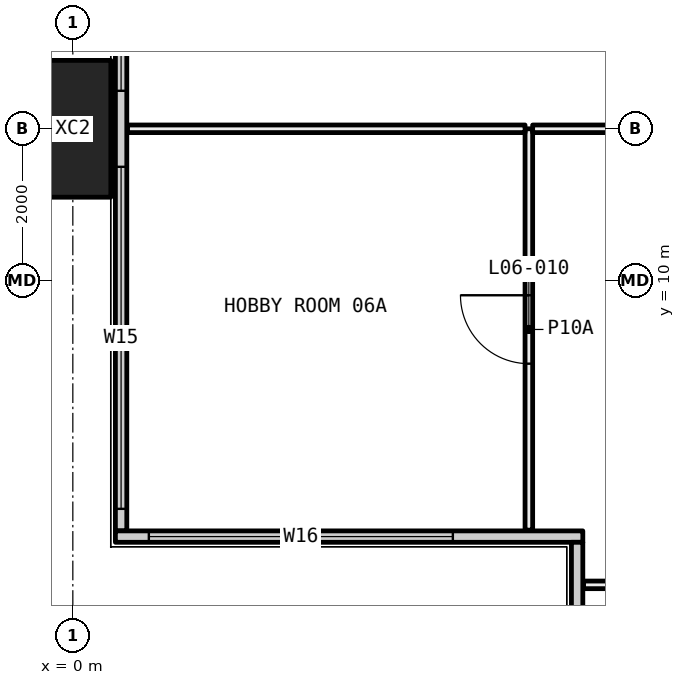
"""IFC4 building model, lengths in metres.
Left out: names, types, materials, properties, quantities, classifications, styles, units other than length and angle.
Written with IfcOpenShell. Run it as: python <this file> out.ifc"""

import sys

from ifc_helpers import new_model, si_unit, direction, frame, frame_2d, origin, origin_2d, place, context, subcontext, project, spatial, rectangle, hollow_rectangle, extrude, element, fill, save


model = new_model("IFC4")
c1 = context("Model", 3, precision=1e-05, world=origin(), true_north=direction((0.0, 1.0)))
c2 = subcontext(c1, "Body", "Model", "MODEL_VIEW")
j1 = project(units=[si_unit("LENGTHUNIT", "METRE"), si_unit("PLANEANGLEUNIT", "RADIAN")], contexts=[c1])
p1 = place(None, origin())
s1 = spatial("IfcSite", under=j1, at=p1, CompositionType="ELEMENT")
p2 = place(p1, origin())
s2 = spatial("IfcBuilding", under=s1, at=p2, CompositionType="ELEMENT")
p3 = place(p2, frame((0.0, 0.0, 33.45)))
s3 = spatial("IfcBuildingStorey", under=s2, at=p3, CompositionType="ELEMENT", Elevation=33.45)
p4 = place(p3, frame((0.0, 12.0, -0.4), z_axis=(0.0, 0.0, 1.0), x_axis=(0.0, 1.0, 0.0)))
e1 = element("IfcColumn", 1, at=p4, inside=s3, PredefinedType="COLUMN", context=c2, shape_type="SweptSolid", body=[
    extrude(hollow_rectangle(XDim=1.8, YDim=1.0, WallThickness=0.07, at=origin_2d()), origin(), (0.0, 0.0, 1.0), 3.45),
])
p5 = place(p3, frame((0.635, 6.71, 0.0), z_axis=(0.0, 0.0, 1.0), x_axis=(0.0, 1.0, 0.0)))
e2 = element("IfcWall", 2, at=p5, inside=s3, PredefinedType="ELEMENTEDWALL", context=c2, shape_type="SweptSolid", body=[
    extrude(rectangle(XDim=34.58, YDim=0.15, at=frame_2d((17.29, 0.0))), origin(), (0.0, 0.0, 1.0), 3.05),
])
p6 = place(p5, frame((0.29, 0.0, 0.45)))
e3 = element("IfcOpeningElement", 3, at=p6, cuts=e2, PredefinedType="OPENING", context=c2, shape_type="SweptSolid", body=[
    extrude(rectangle(XDim=4.5, YDim=2.55, at=frame_2d((2.25, 1.275))), frame((0.0, 0.085, 0.0), z_axis=(0.0, -1.0, 0.0), x_axis=(1.0, 0.0, 0.0)), (0.0, 0.0, 1.0), 0.17),
])
p7 = place(p5, frame((5.79, 0.0, 0.45)))
e4 = element("IfcOpeningElement", 4, at=p7, cuts=e2, PredefinedType="OPENING", context=c2, shape_type="SweptSolid", body=[
    extrude(rectangle(XDim=1.25, YDim=2.55, at=frame_2d((0.625, 1.275))), frame((0.0, 0.085, 0.0), z_axis=(0.0, -1.0, 0.0), x_axis=(1.0, 0.0, 0.0)), (0.0, 0.0, 1.0), 0.17),
])
p8 = place(p5, frame((9.79, 0.0, 0.45)))
e5 = element("IfcOpeningElement", 5, at=p8, cuts=e2, PredefinedType="OPENING", context=c2, shape_type="SweptSolid", body=[
    extrude(rectangle(XDim=1.0, YDim=2.55, at=frame_2d((0.5, 1.275))), frame((0.0, 0.085, 0.0), z_axis=(0.0, -1.0, 0.0), x_axis=(1.0, 0.0, 0.0)), (0.0, 0.0, 1.0), 0.17),
])
p9 = place(p5, frame((11.79, 0.0, 0.45)))
e6 = element("IfcOpeningElement", 6, at=p9, cuts=e2, PredefinedType="OPENING", context=c2, shape_type="SweptSolid", body=[
    extrude(rectangle(XDim=1.0, YDim=2.55, at=frame_2d((0.5, 1.275))), frame((0.0, 0.085, 0.0), z_axis=(0.0, -1.0, 0.0), x_axis=(1.0, 0.0, 0.0)), (0.0, 0.0, 1.0), 0.17),
])
p10 = place(p5, frame((15.54, 0.0, 0.45)))
e7 = element("IfcOpeningElement", 7, at=p10, cuts=e2, PredefinedType="OPENING", context=c2, shape_type="SweptSolid", body=[
    extrude(rectangle(XDim=1.25, YDim=2.55, at=frame_2d((0.625, 1.275))), frame((0.0, 0.085, 0.0), z_axis=(0.0, -1.0, 0.0), x_axis=(1.0, 0.0, 0.0)), (0.0, 0.0, 1.0), 0.17),
])
p11 = place(p5, frame((17.79, 0.0, 0.45)))
e8 = element("IfcOpeningElement", 8, at=p11, cuts=e2, PredefinedType="OPENING", context=c2, shape_type="SweptSolid", body=[
    extrude(rectangle(XDim=1.25, YDim=2.55, at=frame_2d((0.625, 1.275))), frame((0.0, 0.085, 0.0), z_axis=(0.0, -1.0, 0.0), x_axis=(1.0, 0.0, 0.0)), (0.0, 0.0, 1.0), 0.17),
])
p12 = place(p5, frame((21.79, 0.0, 0.45)))
e9 = element("IfcOpeningElement", 9, at=p12, cuts=e2, PredefinedType="OPENING", context=c2, shape_type="SweptSolid", body=[
    extrude(rectangle(XDim=1.0, YDim=2.55, at=frame_2d((0.5, 1.275))), frame((0.0, 0.085, 0.0), z_axis=(0.0, -1.0, 0.0), x_axis=(1.0, 0.0, 0.0)), (0.0, 0.0, 1.0), 0.17),
])
p13 = place(p5, frame((23.79, 0.0, 0.45)))
e10 = element("IfcOpeningElement", 10, at=p13, cuts=e2, PredefinedType="OPENING", context=c2, shape_type="SweptSolid", body=[
    extrude(rectangle(XDim=1.0, YDim=2.55, at=frame_2d((0.5, 1.275))), frame((0.0, 0.085, 0.0), z_axis=(0.0, -1.0, 0.0), x_axis=(1.0, 0.0, 0.0)), (0.0, 0.0, 1.0), 0.17),
])
p14 = place(p5, frame((27.54, 0.0, 0.45)))
e11 = element("IfcOpeningElement", 11, at=p14, cuts=e2, PredefinedType="OPENING", context=c2, shape_type="SweptSolid", body=[
    extrude(rectangle(XDim=1.25, YDim=2.55, at=frame_2d((0.625, 1.275))), frame((0.0, 0.085, 0.0), z_axis=(0.0, -1.0, 0.0), x_axis=(1.0, 0.0, 0.0)), (0.0, 0.0, 1.0), 0.17),
])
p15 = place(p5, frame((29.79, 0.0, 0.45)))
e12 = element("IfcOpeningElement", 12, at=p15, cuts=e2, PredefinedType="OPENING", context=c2, shape_type="SweptSolid", body=[
    extrude(rectangle(XDim=4.5, YDim=2.55, at=frame_2d((2.25, 1.275))), frame((0.0, 0.085, 0.0), z_axis=(0.0, -1.0, 0.0), x_axis=(1.0, 0.0, 0.0)), (0.0, 0.0, 1.0), 0.17),
])
p16 = place(p3, frame((0.56, 6.635, 0.0), z_axis=(0.0, 0.0, 1.0), x_axis=(1.0, 0.0, 0.0)))
e13 = element("IfcWall", 13, at=p16, inside=s3, PredefinedType="ELEMENTEDWALL", context=c2, shape_type="SweptSolid", body=[
    extrude(rectangle(XDim=6.15, YDim=0.15, at=frame_2d((3.075, 0.0))), origin(), (0.0, 0.0, 1.0), 3.05),
])
p17 = place(p16, frame((0.44, 0.0, 0.45)))
e14 = element("IfcOpeningElement", 14, at=p17, cuts=e13, PredefinedType="OPENING", context=c2, shape_type="SweptSolid", body=[
    extrude(rectangle(XDim=4.0, YDim=2.55, at=frame_2d((2.0, 1.275))), frame((0.0, 0.085, 0.0), z_axis=(0.0, -1.0, 0.0), x_axis=(1.0, 0.0, 0.0)), (0.0, 0.0, 1.0), 0.17),
])
p18 = place(p3, frame((6.635, 0.71, 0.0), z_axis=(0.0, 0.0, 1.0), x_axis=(0.0, 1.0, 0.0)))
e15 = element("IfcWall", 15, at=p18, inside=s3, PredefinedType="ELEMENTEDWALL", context=c2, shape_type="SweptSolid", body=[
    extrude(rectangle(XDim=5.85, YDim=0.15, at=frame_2d((2.925, 0.0))), origin(), (0.0, 0.0, 1.0), 3.05),
])
p19 = place(p18, frame((0.29, 0.0, 0.45)))
e16 = element("IfcOpeningElement", 16, at=p19, cuts=e15, PredefinedType="OPENING", context=c2, shape_type="SweptSolid", body=[
    extrude(rectangle(XDim=4.0, YDim=2.55, at=frame_2d((2.0, 1.275))), frame((0.0, 0.085, 0.0), z_axis=(0.0, -1.0, 0.0), x_axis=(1.0, 0.0, 0.0)), (0.0, 0.0, 1.0), 0.17),
])
p20 = place(p3, frame((11.95, 6.0, 0.0), z_axis=(0.0, 0.0, 1.0), x_axis=(-1.0, 0.0, 0.0)))
e17 = element("IfcWall", 17, at=p20, inside=s3, PredefinedType="PARTITIONING", context=c2, shape_type="SweptSolid", body=[
    extrude(rectangle(XDim=5.23, YDim=0.1, at=frame_2d((2.615, 0.0))), origin(), (0.0, 0.0, 1.0), 2.45),
])
p21 = place(p20, frame((2.165, 0.0, 0.0)))
e18 = element("IfcOpeningElement", 18, at=p21, cuts=e17, PredefinedType="OPENING", context=c2, shape_type="SweptSolid", body=[
    extrude(rectangle(XDim=0.9, YDim=2.1, at=frame_2d((0.45, 1.05))), frame((0.0, 0.06, 0.0), z_axis=(0.0, -1.0, 0.0), x_axis=(1.0, 0.0, 0.0)), (0.0, 0.0, 1.0), 0.12),
])
p22 = place(p3, frame((6.0, 6.72, 0.0), z_axis=(0.0, 0.0, 1.0), x_axis=(0.0, 1.0, 0.0)))
e19 = element("IfcWall", 19, at=p22, inside=s3, PredefinedType="PARTITIONING", context=c2, shape_type="SweptSolid", body=[
    extrude(rectangle(XDim=5.28, YDim=0.1, at=frame_2d((2.64, 0.0))), origin(), (0.0, 0.0, 1.0), 2.45),
])
p23 = place(p22, frame((2.19, 0.0, 0.0)))
e20 = element("IfcOpeningElement", 20, at=p23, cuts=e19, PredefinedType="OPENING", context=c2, shape_type="SweptSolid", body=[
    extrude(rectangle(XDim=0.9, YDim=2.1, at=frame_2d((0.45, 1.05))), frame((0.0, 0.06, 0.0), z_axis=(0.0, -1.0, 0.0), x_axis=(1.0, 0.0, 0.0)), (0.0, 0.0, 1.0), 0.12),
])
p24 = place(p3, frame((5.95, 12.0, 0.0), z_axis=(0.0, 0.0, 1.0), x_axis=(-1.0, 0.0, 0.0)))
e21 = element("IfcWall", 21, at=p24, inside=s3, PredefinedType="PARTITIONING", context=c2, shape_type="SweptSolid", body=[
    extrude(rectangle(XDim=5.23, YDim=0.1, at=frame_2d((2.615, 0.0))), origin(), (0.0, 0.0, 1.0), 2.45),
])
p25 = place(p3, frame((11.2, 12.0, 0.0), z_axis=(0.0, 0.0, 1.0), x_axis=(-1.0, 0.0, 0.0)))
e22 = element("IfcWall", 22, at=p25, inside=s3, PredefinedType="PARTITIONING", context=c2, shape_type="SweptSolid", body=[
    extrude(rectangle(XDim=5.15, YDim=0.1, at=frame_2d((2.575, 0.0))), origin(), (0.0, 0.0, 1.0), 2.45),
])
p26 = place(p25, frame((2.125, 0.0, 0.0)))
e23 = element("IfcOpeningElement", 23, at=p26, cuts=e22, PredefinedType="OPENING", context=c2, shape_type="SweptSolid", body=[
    extrude(rectangle(XDim=0.9, YDim=2.1, at=frame_2d((0.45, 1.05))), frame((0.0, 0.06, 0.0), z_axis=(0.0, -1.0, 0.0), x_axis=(1.0, 0.0, 0.0)), (0.0, 0.0, 1.0), 0.12),
])
p27 = place(p6, origin())
e24 = element("IfcWindow", 24, at=p27, inside=s3, PartitioningType="SINGLE_PANEL", PredefinedType="WINDOW", context=c2, shape_type="SweptSolid", body=[
    extrude(rectangle(XDim=4.5, YDim=2.55, at=frame_2d((2.25, 1.275))), frame((0.0, 0.03, 0.0), z_axis=(0.0, -1.0, 0.0), x_axis=(1.0, 0.0, 0.0)), (0.0, 0.0, 1.0), 0.06),
])
fill(e3, e24)
p28 = place(p7, origin())
e25 = element("IfcWindow", 25, at=p28, inside=s3, PartitioningType="SINGLE_PANEL", PredefinedType="WINDOW", context=c2, shape_type="SweptSolid", body=[
    extrude(rectangle(XDim=1.25, YDim=2.55, at=frame_2d((0.625, 1.275))), frame((0.0, 0.03, 0.0), z_axis=(0.0, -1.0, 0.0), x_axis=(1.0, 0.0, 0.0)), (0.0, 0.0, 1.0), 0.06),
])
fill(e4, e25)
p29 = place(p17, origin())
e26 = element("IfcWindow", 26, at=p29, inside=s3, PartitioningType="SINGLE_PANEL", PredefinedType="WINDOW", context=c2, shape_type="SweptSolid", body=[
    extrude(rectangle(XDim=4.0, YDim=2.55, at=frame_2d((2.0, 1.275))), frame((0.0, 0.03, 0.0), z_axis=(0.0, -1.0, 0.0), x_axis=(1.0, 0.0, 0.0)), (0.0, 0.0, 1.0), 0.06),
])
fill(e14, e26)
p30 = place(p23, origin())
e27 = element("IfcDoor", 27, at=p30, inside=s3, OperationType="SINGLE_SWING_LEFT", PredefinedType="DOOR", context=c2, shape_type="SweptSolid", body=[
    extrude(rectangle(XDim=0.9, YDim=2.1, at=frame_2d((0.45, 1.05))), frame((0.0, 0.025, 0.0), z_axis=(0.0, -1.0, 0.0), x_axis=(1.0, 0.0, 0.0)), (0.0, 0.0, 1.0), 0.05),
])
fill(e20, e27)
save(model, sys.argv[1])
